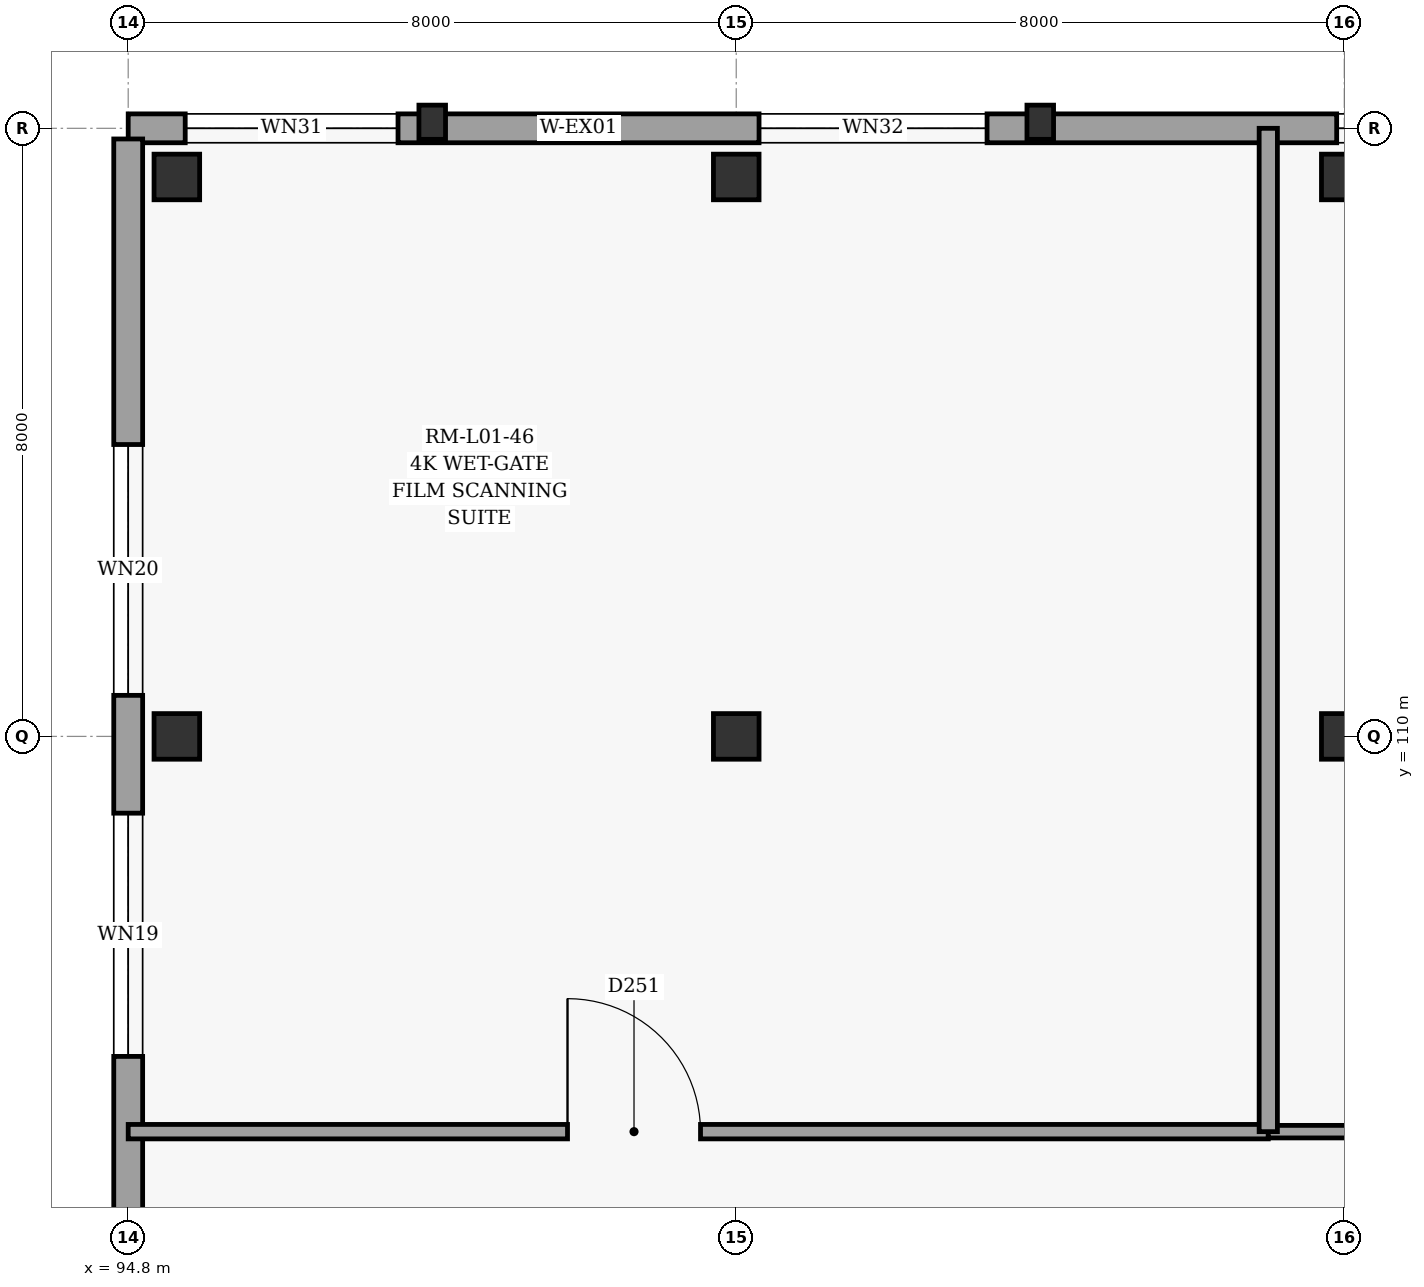
"""IFC4 building model, lengths in metres.
Left out: names, types, materials, properties, quantities, classifications, styles, units other than length and angle.
Written with IfcOpenShell. Run it as: python <this file> out.ifc"""

import sys

from ifc_helpers import new_model, si_unit, direction, frame, frame_2d, origin, origin_2d, place, context, subcontext, project, spatial, rectangle, extrude, element, fill, save


model = new_model("IFC4")
c1 = context("Model", 3, precision=1e-05, world=origin(), true_north=direction((0.0, 1.0)))
c2 = subcontext(c1, "Body", "Model", "MODEL_VIEW")
j1 = project(units=[si_unit("LENGTHUNIT", "METRE"), si_unit("PLANEANGLEUNIT", "RADIAN")], contexts=[c1])
p1 = place(None, origin())
s1 = spatial("IfcSite", under=j1, at=p1, CompositionType="ELEMENT")
p2 = place(p1, origin())
s2 = spatial("IfcBuilding", under=s1, at=p2, CompositionType="ELEMENT")
p3 = place(p2, frame((0.0, 0.0, 5.4)))
s3 = spatial("IfcBuildingStorey", under=s2, at=p3, CompositionType="ELEMENT", Elevation=5.4)
for number, where, z_axis, x_axis in (
    (1, (95.44, 110.0, 0.0), (0.0, 0.0, 1.0), (1.0, 0.0, 0.0)),
    (2, (95.44, 117.36, 0.0), (0.0, 0.0, 1.0), (1.0, 0.0, 0.0)),
    (3, (102.8, 110.0, 0.0), (0.0, 0.0, 1.0), (1.0, 0.0, 0.0)),
    (4, (102.8, 117.36, 0.0), (0.0, 0.0, 1.0), (1.0, 0.0, 0.0)),
    (5, (110.8, 110.0, 0.0), (0.0, 0.0, 1.0), (1.0, 0.0, 0.0)),
    (6, (110.8, 117.36, 0.0), (0.0, 0.0, 1.0), (1.0, 0.0, 0.0)),
):
    element("IfcColumn", number, at=place(p3, frame(where, z_axis=z_axis, x_axis=x_axis)), inside=s3, PredefinedType="COLUMN", context=c2, shape_type="SweptSolid", body=[
        extrude(rectangle(XDim=0.6, YDim=0.6, at=origin_2d()), origin(), (0.0, 0.0, 1.0), 4.8),
    ])
for number, where, z_axis, x_axis in (
    (7, (98.8, 118.08, 0.0), (0.0, 0.0, 1.0), (0.0, 1.0, 0.0)),
    (8, (106.8, 118.08, 0.0), (0.0, 0.0, 1.0), (0.0, 1.0, 0.0)),
):
    element("IfcColumn", number, at=place(p3, frame(where, z_axis=z_axis, x_axis=x_axis)), inside=s3, PredefinedType="PILASTER", context=c2, shape_type="SweptSolid", body=[
        extrude(rectangle(XDim=0.35, YDim=0.45, at=origin_2d()), origin(), (0.0, 0.0, 1.0), 4.8),
    ])
p4 = place(p3, frame((94.8, 118.0, 0.0), z_axis=(0.0, 0.0, 1.0), x_axis=(1.0, 0.0, 0.0)))
e9 = element("IfcWall", 9, at=p4, inside=s3, PredefinedType="SOLIDWALL", context=c2, shape_type="SweptSolid", body=[
    extrude(rectangle(XDim=44.795, YDim=0.38, at=frame_2d((22.397, 0.0))), origin(), (0.0, 0.0, 1.0), 4.54),
])
p5 = place(p4, frame((0.75, 0.0, 0.9)))
e10 = element("IfcOpeningElement", 10, at=p5, cuts=e9, PredefinedType="OPENING", context=c2, shape_type="SweptSolid", body=[
    extrude(rectangle(XDim=2.8, YDim=1.8, at=frame_2d((1.4, 0.9))), frame((0.0, 0.2, 0.0), z_axis=(0.0, -1.0, 0.0), x_axis=(1.0, 0.0, 0.0)), (0.0, 0.0, 1.0), 0.4),
])
p6 = place(p4, frame((8.3, 0.0, 0.9)))
e11 = element("IfcOpeningElement", 11, at=p6, cuts=e9, PredefinedType="OPENING", context=c2, shape_type="SweptSolid", body=[
    extrude(rectangle(XDim=3.0, YDim=1.8, at=frame_2d((1.5, 0.9))), frame((0.0, 0.2, 0.0), z_axis=(0.0, -1.0, 0.0), x_axis=(1.0, 0.0, 0.0)), (0.0, 0.0, 1.0), 0.4),
])
p7 = place(p4, frame((15.9, 0.0, 0.9)))
e12 = element("IfcOpeningElement", 12, at=p7, cuts=e9, PredefinedType="OPENING", context=c2, shape_type="SweptSolid", body=[
    extrude(rectangle(XDim=3.2, YDim=1.85, at=frame_2d((1.6, 0.925))), frame((0.0, 0.2, 0.0), z_axis=(0.0, -1.0, 0.0), x_axis=(1.0, 0.0, 0.0)), (0.0, 0.0, 1.0), 0.4),
])
p8 = place(p4, frame((22.75, 0.0, 0.9)))
e13 = element("IfcOpeningElement", 13, at=p8, cuts=e9, PredefinedType="OPENING", context=c2, shape_type="SweptSolid", body=[
    extrude(rectangle(XDim=3.4, YDim=1.85, at=frame_2d((1.7, 0.925))), frame((0.0, 0.2, 0.0), z_axis=(0.0, -1.0, 0.0), x_axis=(1.0, 0.0, 0.0)), (0.0, 0.0, 1.0), 0.4),
])
p9 = place(p4, frame((30.35, 0.0, 0.9)))
e14 = element("IfcOpeningElement", 14, at=p9, cuts=e9, PredefinedType="OPENING", context=c2, shape_type="SweptSolid", body=[
    extrude(rectangle(XDim=3.6, YDim=1.9, at=frame_2d((1.8, 0.95))), frame((0.0, 0.2, 0.0), z_axis=(0.0, -1.0, 0.0), x_axis=(1.0, 0.0, 0.0)), (0.0, 0.0, 1.0), 0.4),
])
p10 = place(p4, frame((36.45, 0.0, 0.9)))
e15 = element("IfcOpeningElement", 15, at=p10, cuts=e9, PredefinedType="OPENING", context=c2, shape_type="SweptSolid", body=[
    extrude(rectangle(XDim=3.8, YDim=1.9, at=frame_2d((1.9, 0.95))), frame((0.0, 0.2, 0.0), z_axis=(0.0, -1.0, 0.0), x_axis=(1.0, 0.0, 0.0)), (0.0, 0.0, 1.0), 0.4),
])
p11 = place(p3, frame((94.8, 102.14, 0.0), z_axis=(0.0, 0.0, 1.0), x_axis=(0.0, 1.0, 0.0)))
e16 = element("IfcWall", 16, at=p11, inside=s3, PredefinedType="SOLIDWALL", context=c2, shape_type="SweptSolid", body=[
    extrude(rectangle(XDim=15.72, YDim=0.38, at=frame_2d((7.86, 0.0))), origin(), (0.0, 0.0, 1.0), 4.54),
])
p12 = place(p11, frame((3.65, 0.0, 0.9)))
e17 = element("IfcOpeningElement", 17, at=p12, cuts=e16, PredefinedType="OPENING", context=c2, shape_type="SweptSolid", body=[
    extrude(rectangle(XDim=3.2, YDim=2.5, at=frame_2d((1.6, 1.25))), frame((0.0, 0.2, 0.0), z_axis=(0.0, -1.0, 0.0), x_axis=(1.0, 0.0, 0.0)), (0.0, 0.0, 1.0), 0.4),
])
p13 = place(p11, frame((8.4, 0.0, 0.9)))
e18 = element("IfcOpeningElement", 18, at=p13, cuts=e16, PredefinedType="OPENING", context=c2, shape_type="SweptSolid", body=[
    extrude(rectangle(XDim=3.3, YDim=2.5, at=frame_2d((1.65, 1.25))), frame((0.0, 0.2, 0.0), z_axis=(0.0, -1.0, 0.0), x_axis=(1.0, 0.0, 0.0)), (0.0, 0.0, 1.0), 0.4),
])
p14 = place(p3, frame((94.8, 104.8, 0.0), z_axis=(0.0, 0.0, 1.0), x_axis=(1.0, 0.0, 0.0)))
e19 = element("IfcWall", 19, at=p14, inside=s3, PredefinedType="PARTITIONING", context=c2, shape_type="SweptSolid", body=[
    extrude(rectangle(XDim=15.0, YDim=0.19, at=frame_2d((7.5, 0.0))), origin(), (0.0, 0.0, 1.0), 4.54),
])
p15 = place(p14, frame((5.78, 0.0, 0.0)))
e20 = element("IfcOpeningElement", 20, at=p15, cuts=e19, PredefinedType="OPENING", context=c2, shape_type="SweptSolid", body=[
    extrude(rectangle(XDim=1.75, YDim=2.35, at=frame_2d((0.875, 1.175))), frame((0.0, 0.105, 0.0), z_axis=(0.0, -1.0, 0.0), x_axis=(1.0, 0.0, 0.0)), (0.0, 0.0, 1.0), 0.21),
])
p16 = place(p3, frame((109.8, 104.8, 0.0), z_axis=(0.0, 0.0, 1.0), x_axis=(1.0, 0.0, 0.0)))
e21 = element("IfcWall", 21, at=p16, inside=s3, PredefinedType="PARTITIONING", context=c2, shape_type="SweptSolid", body=[
    extrude(rectangle(XDim=15.0, YDim=0.165, at=frame_2d((7.5, 0.0))), origin(), (0.0, 0.0, 1.0), 4.54),
])
p17 = place(p16, frame((7.03, 0.0, 0.0)))
e22 = element("IfcOpeningElement", 22, at=p17, cuts=e21, PredefinedType="OPENING", context=c2, shape_type="SweptSolid", body=[
    extrude(rectangle(XDim=0.94, YDim=2.15, at=frame_2d((0.47, 1.075))), frame((0.0, 0.093, 0.0), z_axis=(0.0, -1.0, 0.0), x_axis=(1.0, 0.0, 0.0)), (0.0, 0.0, 1.0), 0.185),
])
p18 = place(p3, frame((109.8, 118.0, 0.0), z_axis=(0.0, 0.0, 1.0), x_axis=(0.0, -1.0, 0.0)))
e23 = element("IfcWall", 23, at=p18, inside=s3, PredefinedType="PARTITIONING", context=c2, shape_type="SweptSolid", body=[
    extrude(rectangle(XDim=13.2, YDim=0.24, at=frame_2d((6.6, 0.0))), origin(), (0.0, 0.0, 1.0), 4.54),
])
p19 = place(p5, origin())
e24 = element("IfcWindow", 24, at=p19, inside=s3, PartitioningType="SINGLE_PANEL", PredefinedType="WINDOW", context=c2, shape_type="SweptSolid", body=[
    extrude(rectangle(XDim=2.8, YDim=1.8, at=frame_2d((1.4, 0.9))), frame((0.0, 0.03, 0.0), z_axis=(0.0, -1.0, 0.0), x_axis=(1.0, 0.0, 0.0)), (0.0, 0.0, 1.0), 0.06),
])
fill(e10, e24)
p20 = place(p6, origin())
e25 = element("IfcWindow", 25, at=p20, inside=s3, PartitioningType="SINGLE_PANEL", PredefinedType="WINDOW", context=c2, shape_type="SweptSolid", body=[
    extrude(rectangle(XDim=3.0, YDim=1.8, at=frame_2d((1.5, 0.9))), frame((0.0, 0.03, 0.0), z_axis=(0.0, -1.0, 0.0), x_axis=(1.0, 0.0, 0.0)), (0.0, 0.0, 1.0), 0.06),
])
fill(e11, e25)
p21 = place(p7, origin())
e26 = element("IfcWindow", 26, at=p21, inside=s3, PartitioningType="SINGLE_PANEL", PredefinedType="WINDOW", context=c2, shape_type="SweptSolid", body=[
    extrude(rectangle(XDim=3.2, YDim=1.85, at=frame_2d((1.6, 0.925))), frame((0.0, 0.03, 0.0), z_axis=(0.0, -1.0, 0.0), x_axis=(1.0, 0.0, 0.0)), (0.0, 0.0, 1.0), 0.06),
])
fill(e12, e26)
p22 = place(p12, origin())
e27 = element("IfcWindow", 27, at=p22, inside=s3, PartitioningType="SINGLE_PANEL", PredefinedType="WINDOW", context=c2, shape_type="SweptSolid", body=[
    extrude(rectangle(XDim=3.2, YDim=2.5, at=frame_2d((1.6, 1.25))), frame((0.0, 0.03, 0.0), z_axis=(0.0, -1.0, 0.0), x_axis=(1.0, 0.0, 0.0)), (0.0, 0.0, 1.0), 0.06),
])
fill(e17, e27)
p23 = place(p13, origin())
e28 = element("IfcWindow", 28, at=p23, inside=s3, PartitioningType="SINGLE_PANEL", PredefinedType="WINDOW", context=c2, shape_type="SweptSolid", body=[
    extrude(rectangle(XDim=3.3, YDim=2.5, at=frame_2d((1.65, 1.25))), frame((0.0, 0.03, 0.0), z_axis=(0.0, -1.0, 0.0), x_axis=(1.0, 0.0, 0.0)), (0.0, 0.0, 1.0), 0.06),
])
fill(e18, e28)
p24 = place(p15, origin())
e29 = element("IfcDoor", 29, at=p24, inside=s3, OperationType="SINGLE_SWING_LEFT", PredefinedType="DOOR", context=c2, shape_type="SweptSolid", body=[
    extrude(rectangle(XDim=1.75, YDim=2.35, at=frame_2d((0.875, 1.175))), frame((0.0, 0.025, 0.0), z_axis=(0.0, -1.0, 0.0), x_axis=(1.0, 0.0, 0.0)), (0.0, 0.0, 1.0), 0.05),
])
fill(e20, e29)
save(model, sys.argv[1])
